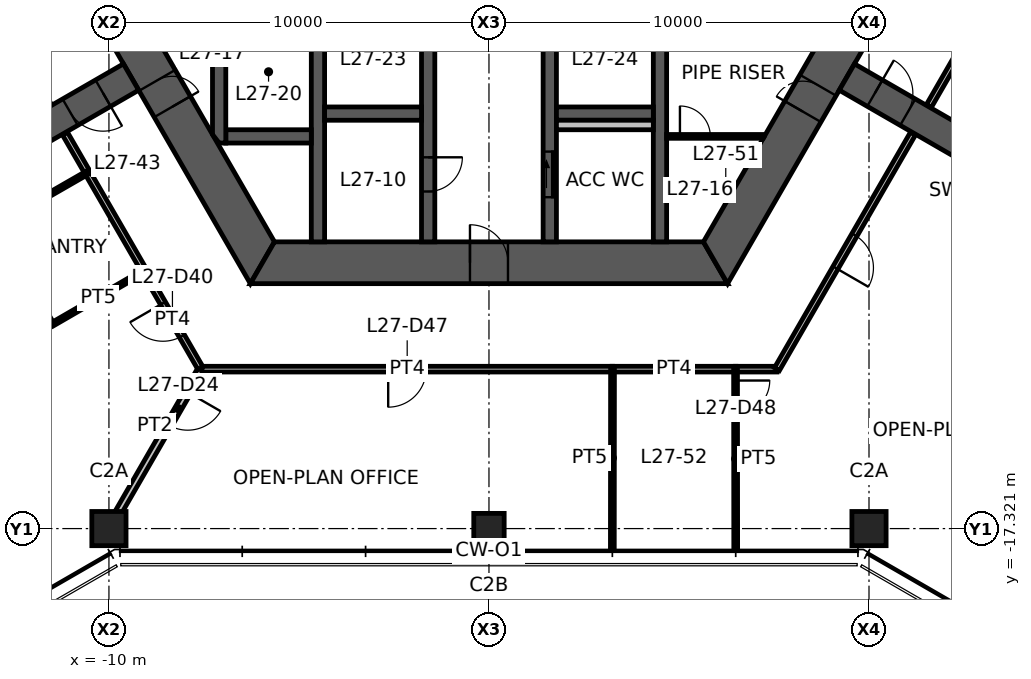
"""IFC4 building model, lengths in metres.
Left out: names, types, materials, properties, quantities, classifications, styles, units other than length and angle.
Written with IfcOpenShell. Run it as: python <this file> out.ifc"""

import sys

from ifc_helpers import new_model, si_unit, direction, frame, frame_2d, origin, origin_2d, place, context, subcontext, project, spatial, polyline, rectangle, hollow_rectangle, outline, extrude, element, fill, save


model = new_model("IFC4")
c1 = context("Model", 3, precision=1e-05, world=origin(), true_north=direction((0.0, 1.0)))
c2 = subcontext(c1, "Body", "Model", "MODEL_VIEW")
j1 = project(units=[si_unit("LENGTHUNIT", "METRE"), si_unit("PLANEANGLEUNIT", "RADIAN")], contexts=[c1])
p1 = place(None, origin())
s1 = spatial("IfcSite", under=j1, at=p1, CompositionType="ELEMENT")
p2 = place(p1, origin())
s2 = spatial("IfcBuilding", under=s1, at=p2, CompositionType="ELEMENT")
p3 = place(p2, frame((0.0, 0.0, 108.0)))
s3 = spatial("IfcBuildingStorey", under=s2, at=p3, CompositionType="ELEMENT", Elevation=108.0)
for number, where, z_axis, x_axis in (
    (1, (-10.0, -17.321, 0.0), (0.0, 0.0, 1.0), (1.0, 0.0, 0.0)),
    (2, (10.0, -17.321, 0.0), (0.0, 0.0, 1.0), (1.0, 0.0, 0.0)),
):
    element("IfcColumn", number, at=place(p3, frame(where, z_axis=z_axis, x_axis=x_axis)), inside=s3, PredefinedType="COLUMN", context=c2, shape_type="SweptSolid", body=[
        extrude(hollow_rectangle(XDim=0.9, YDim=0.9, WallThickness=0.055, at=origin_2d()), origin(), (0.0, 0.0, 1.0), 3.9),
    ])
p4 = place(p3, frame((0.0, -17.321, 0.0), z_axis=(0.0, 0.0, 1.0), x_axis=(1.0, 0.0, 0.0)))
e3 = element("IfcColumn", 3, at=p4, inside=s3, PredefinedType="COLUMN", context=c2, shape_type="SweptSolid", body=[
    extrude(hollow_rectangle(XDim=0.8, YDim=0.8, WallThickness=0.045, at=origin_2d()), origin(), (0.0, 0.0, 1.0), 3.9),
])
p5 = place(p3, frame((-11.922, 0.0, 0.0), z_axis=(0.0, 0.0, 1.0), x_axis=(0.500004296715, -0.866022923061, 0.0)))
e4 = element("IfcWall", 4, at=p5, inside=s3, PredefinedType="SHEAR", context=c2, shape_type="SweptSolid", body=[
    extrude(outline(polyline([(-0.318, -0.55), (6.381, -0.55), (7.181, -0.55), (12.24, -0.55), (11.605, 0.55), (7.181, 0.55), (6.381, 0.55), (0.318, 0.55), (-0.318, -0.55)])), origin(), (0.0, 0.0, 1.0), 3.9),
])
p6 = place(p5, frame((6.381, 0.0, 0.0)))
e5 = element("IfcOpeningElement", 5, at=p6, cuts=e4, PredefinedType="OPENING", context=c2, shape_type="SweptSolid", body=[
    extrude(rectangle(XDim=0.8, YDim=2.1, at=frame_2d((0.4, 1.05))), frame((0.0, 0.56, 0.0), z_axis=(0.0, -1.0, 0.0), x_axis=(1.0, 0.0, 0.0)), (0.0, 0.0, 1.0), 1.12),
])
p7 = place(p3, frame((-5.961, -10.325, 0.0), z_axis=(0.0, 0.0, 1.0), x_axis=(1.0, 0.0, 0.0)))
e6 = element("IfcWall", 6, at=p7, inside=s3, PredefinedType="SHEAR", context=c2, shape_type="SweptSolid", body=[
    extrude(outline(polyline([(-0.318, -0.55), (5.461, -0.55), (6.461, -0.55), (12.24, -0.55), (11.605, 0.55), (6.461, 0.55), (5.461, 0.55), (0.318, 0.55), (-0.318, -0.55)])), origin(), (0.0, 0.0, 1.0), 3.9),
])
p8 = place(p7, frame((5.461, 0.0, 0.0)))
e7 = element("IfcOpeningElement", 7, at=p8, cuts=e6, PredefinedType="OPENING", context=c2, shape_type="SweptSolid", body=[
    extrude(rectangle(XDim=1.0, YDim=2.1, at=frame_2d((0.5, 1.05))), frame((0.0, 0.56, 0.0), z_axis=(0.0, -1.0, 0.0), x_axis=(1.0, 0.0, 0.0)), (0.0, 0.0, 1.0), 1.12),
])
p9 = place(p3, frame((5.961, -10.325, 0.0), z_axis=(0.0, 0.0, 1.0), x_axis=(0.500004296715, 0.866022923061, 0.0)))
e8 = element("IfcWall", 8, at=p9, inside=s3, PredefinedType="SHEAR", context=c2, shape_type="SweptSolid", body=[
    extrude(outline(polyline([(-0.318, -0.55), (4.594, -0.55), (5.394, -0.55), (12.24, -0.55), (11.605, 0.55), (5.394, 0.55), (4.594, 0.55), (0.318, 0.55), (-0.318, -0.55)])), origin(), (0.0, 0.0, 1.0), 3.9),
])
p10 = place(p9, frame((4.594, 0.0, 0.0)))
e9 = element("IfcOpeningElement", 9, at=p10, cuts=e8, PredefinedType="OPENING", context=c2, shape_type="SweptSolid", body=[
    extrude(rectangle(XDim=0.8, YDim=2.1, at=frame_2d((0.4, 1.05))), frame((0.0, 0.56, 0.0), z_axis=(0.0, -1.0, 0.0), x_axis=(1.0, 0.0, 0.0)), (0.0, 0.0, 1.0), 1.12),
])
p11 = place(p3, frame((-9.418, -5.438, 0.0), z_axis=(0.0, 0.0, 1.0), x_axis=(-0.866029782078, -0.499992416496, 0.0)))
e10 = element("IfcWall", 10, at=p11, inside=s3, PredefinedType="SHEAR", context=c2, shape_type="SweptSolid", body=[
    extrude(rectangle(XDim=7.646, YDim=0.8, at=frame_2d((3.823, 0.0))), origin(), (0.0, 0.0, 1.0), 3.9),
])
p12 = place(p11, frame((0.85, 0.0, 0.0)))
e11 = element("IfcOpeningElement", 11, at=p12, cuts=e10, PredefinedType="OPENING", context=c2, shape_type="SweptSolid", body=[
    extrude(rectangle(XDim=1.0, YDim=2.1, at=frame_2d((0.5, 1.05))), frame((0.0, 0.41, 0.0), z_axis=(0.0, -1.0, 0.0), x_axis=(1.0, 0.0, 0.0)), (0.0, 0.0, 1.0), 0.82),
])
p13 = place(p3, frame((9.418, -5.438, 0.0), z_axis=(0.0, 0.0, 1.0), x_axis=(0.866029782078, -0.499992416496, 0.0)))
e12 = element("IfcWall", 12, at=p13, inside=s3, PredefinedType="SHEAR", context=c2, shape_type="SweptSolid", body=[
    extrude(rectangle(XDim=7.646, YDim=0.8, at=frame_2d((3.823, 0.0))), origin(), (0.0, 0.0, 1.0), 3.9),
])
p14 = place(p13, frame((0.85, 0.0, 0.0)))
e13 = element("IfcOpeningElement", 13, at=p14, cuts=e12, PredefinedType="OPENING", context=c2, shape_type="SweptSolid", body=[
    extrude(rectangle(XDim=1.0, YDim=2.1, at=frame_2d((0.5, 1.05))), frame((0.0, 0.41, 0.0), z_axis=(0.0, -1.0, 0.0), x_axis=(1.0, 0.0, 0.0)), (0.0, 0.0, 1.0), 0.82),
])
p15 = place(p3, frame((-1.6, -3.775, 0.0), z_axis=(0.0, 0.0, 1.0), x_axis=(0.0, -1.0, 0.0)))
e14 = element("IfcWall", 14, at=p15, inside=s3, PredefinedType="SHEAR", context=c2, shape_type="SweptSolid", body=[
    extrude(rectangle(XDim=6.0, YDim=0.35, at=frame_2d((3.0, 0.0))), origin(), (0.0, 0.0, 1.0), 3.9),
])
p16 = place(p15, frame((3.775, 0.0, 0.0)))
e15 = element("IfcOpeningElement", 15, at=p16, cuts=e14, PredefinedType="OPENING", context=c2, shape_type="SweptSolid", body=[
    extrude(rectangle(XDim=0.9, YDim=2.1, at=frame_2d((0.45, 1.05))), frame((0.0, 0.185, 0.0), z_axis=(0.0, -1.0, 0.0), x_axis=(1.0, 0.0, 0.0)), (0.0, 0.0, 1.0), 0.37),
])
p17 = place(p3, frame((1.6, -3.775, 0.0), z_axis=(0.0, 0.0, 1.0), x_axis=(0.0, -1.0, 0.0)))
e16 = element("IfcWall", 16, at=p17, inside=s3, PredefinedType="SHEAR", context=c2, shape_type="SweptSolid", body=[
    extrude(rectangle(XDim=6.0, YDim=0.35, at=frame_2d((3.0, 0.0))), origin(), (0.0, 0.0, 1.0), 3.9),
])
p18 = place(p17, frame((3.625, 0.0, 0.0)))
e17 = element("IfcOpeningElement", 17, at=p18, cuts=e16, PredefinedType="OPENING", context=c2, shape_type="SweptSolid", body=[
    extrude(rectangle(XDim=1.2, YDim=2.1, at=frame_2d((0.6, 1.05))), frame((0.0, 0.185, 0.0), z_axis=(0.0, -1.0, 0.0), x_axis=(1.0, 0.0, 0.0)), (0.0, 0.0, 1.0), 0.37),
])
for number, where, z_axis, x_axis in (
    (18, (-4.5, -3.775, 0.0), (0.0, 0.0, 1.0), (0.0, -1.0, 0.0)),
    (19, (4.5, -3.775, 0.0), (0.0, 0.0, 1.0), (0.0, -1.0, 0.0)),
):
    element("IfcWall", number, at=place(p3, frame(where, z_axis=z_axis, x_axis=x_axis)), inside=s3, PredefinedType="SHEAR", context=c2, shape_type="SweptSolid", body=[
        extrude(rectangle(XDim=6.0, YDim=0.35, at=frame_2d((3.0, 0.0))), origin(), (0.0, 0.0, 1.0), 3.9),
    ])
for number, where, z_axis, x_axis in (
    (20, (-4.325, -6.4, 0.0), (0.0, 0.0, 1.0), (1.0, 0.0, 0.0)),
    (21, (1.775, -6.4, 0.0), (0.0, 0.0, 1.0), (1.0, 0.0, 0.0)),
):
    element("IfcWall", number, at=place(p3, frame(where, z_axis=z_axis, x_axis=x_axis)), inside=s3, PredefinedType="SHEAR", context=c2, shape_type="SweptSolid", body=[
        extrude(rectangle(XDim=2.55, YDim=0.35, at=frame_2d((1.275, 0.0))), origin(), (0.0, 0.0, 1.0), 3.9),
    ])
p19 = place(p3, frame((-6.925, -7.0, 0.0), z_axis=(0.0, 0.0, 1.0), x_axis=(1.0, 0.0, 0.0)))
e22 = element("IfcWall", 22, at=p19, inside=s3, PredefinedType="SHEAR", context=c2, shape_type="SweptSolid", body=[
    extrude(rectangle(XDim=2.25, YDim=0.35, at=frame_2d((1.125, 0.0))), origin(), (0.0, 0.0, 1.0), 3.9),
])
p20 = place(p3, frame((-7.1, -3.775, 0.0), z_axis=(0.0, 0.0, 1.0), x_axis=(0.0, -1.0, 0.0)))
e23 = element("IfcWall", 23, at=p20, inside=s3, PredefinedType="SHEAR", context=c2, shape_type="SweptSolid", body=[
    extrude(outline(polyline([(0.0, -0.175), (3.175, -0.175), (3.4, 0.0), (3.4, 0.175), (0.0, 0.175), (0.0, -0.175)])), origin(), (0.0, 0.0, 1.0), 3.9),
])
p21 = place(p3, frame((1.775, -6.7, 0.0), z_axis=(0.0, 0.0, 1.0), x_axis=(1.0, 0.0, 0.0)))
e24 = element("IfcWall", 24, at=p21, inside=s3, PredefinedType="PLUMBINGWALL", context=c2, shape_type="SweptSolid", body=[
    extrude(rectangle(XDim=2.55, YDim=0.25, at=frame_2d((1.275, 0.0))), origin(), (0.0, 0.0, 1.0), 3.9),
])
p22 = place(p3, frame((4.675, -7.0, 0.0), z_axis=(0.0, 0.0, 1.0), x_axis=(1.0, 0.0, 0.0)))
e25 = element("IfcWall", 25, at=p22, inside=s3, PredefinedType="PARTITIONING", context=c2, shape_type="SweptSolid", body=[
    extrude(outline(polyline([(0.0, -0.05), (0.35, -0.05), (1.15, -0.05), (2.542, -0.05), (2.571, 0.0), (2.577, 0.05), (1.15, 0.05), (0.35, 0.05), (0.0, 0.05), (0.0, -0.05)])), origin(), (0.0, 0.0, 1.0), 2.95),
])
p23 = place(p22, frame((0.35, 0.0, 0.0)))
e26 = element("IfcOpeningElement", 26, at=p23, cuts=e25, PredefinedType="OPENING", context=c2, shape_type="SweptSolid", body=[
    extrude(rectangle(XDim=0.8, YDim=2.1, at=frame_2d((0.4, 1.05))), frame((0.0, 0.06, 0.0), z_axis=(0.0, -1.0, 0.0), x_axis=(1.0, 0.0, 0.0)), (0.0, 0.0, 1.0), 0.12),
])
p24 = place(p3, frame((-7.578, -13.125, 0.0), z_axis=(0.0, 0.0, 1.0), x_axis=(-0.500008905493, -0.866020262135, 0.0)))
e27 = element("IfcWall", 27, at=p24, inside=s3, PredefinedType="PARTITIONING", context=c2, shape_type="SweptSolid", body=[
    extrude(rectangle(XDim=4.845, YDim=0.175, at=frame_2d((2.422, 0.0))), origin(), (0.0, 0.0, 1.0), 3.05),
])
p25 = place(p24, frame((0.7, 0.0, 0.0)))
e28 = element("IfcOpeningElement", 28, at=p25, cuts=e27, PredefinedType="OPENING", context=c2, shape_type="SweptSolid", body=[
    extrude(rectangle(XDim=1.0, YDim=2.1, at=frame_2d((0.5, 1.05))), frame((0.0, 0.098, 0.0), z_axis=(0.0, -1.0, 0.0), x_axis=(1.0, 0.0, 0.0)), (0.0, 0.0, 1.0), 0.195),
])
p26 = place(p3, frame((-9.064, -10.551, 0.0), z_axis=(0.0, 0.0, 1.0), x_axis=(-0.499977562641, 0.866038357612, 0.0)))
e29 = element("IfcWall", 29, at=p26, inside=s3, PredefinedType="PARTITIONING", context=c2, shape_type="SweptSolid", body=[
    extrude(rectangle(XDim=3.01, YDim=0.15, at=frame_2d((1.505, 0.0))), origin(), (0.0, 0.0, 1.0), 2.95),
])
p27 = place(p3, frame((-10.564, -7.952, 0.0), z_axis=(0.0, 0.0, 1.0), x_axis=(-0.500085263423, 0.865976171327, 0.0)))
e30 = element("IfcWall", 30, at=p27, inside=s3, PredefinedType="PARTITIONING", context=c2, shape_type="SweptSolid", body=[
    extrude(rectangle(XDim=1.184, YDim=0.15, at=frame_2d((0.592, 0.0))), origin(), (0.0, 0.0, 1.0), 2.95),
])
p28 = place(p3, frame((-7.589, -13.105, 0.0), z_axis=(0.0, 0.0, 1.0), x_axis=(-0.499972416139, 0.866041328748, 0.0)))
e31 = element("IfcWall", 31, at=p28, inside=s3, PredefinedType="PARTITIONING", context=c2, shape_type="SweptSolid", body=[
    extrude(rectangle(XDim=2.959, YDim=0.15, at=frame_2d((1.479, 0.0))), origin(), (0.0, 0.0, 1.0), 2.95),
])
p29 = place(p28, frame((0.979, 0.0, 0.0)))
e32 = element("IfcOpeningElement", 32, at=p29, cuts=e31, PredefinedType="OPENING", context=c2, shape_type="SweptSolid", body=[
    extrude(rectangle(XDim=1.0, YDim=2.1, at=frame_2d((0.5, 1.05))), frame((0.0, 0.085, 0.0), z_axis=(0.0, -1.0, 0.0), x_axis=(1.0, 0.0, 0.0)), (0.0, 0.0, 1.0), 0.17),
])
p30 = place(p3, frame((-12.991, -9.348, 0.0), z_axis=(0.0, 0.0, 1.0), x_axis=(0.866817750494, 0.498625097071, 0.0)))
e33 = element("IfcWall", 33, at=p30, inside=s3, PredefinedType="PARTITIONING", context=c2, shape_type="SweptSolid", body=[
    extrude(rectangle(XDim=2.8, YDim=0.1, at=frame_2d((1.4, 0.0))), origin(), (0.0, 0.0, 1.0), 2.95),
])
p31 = place(p3, frame((-11.491, -11.946, 0.0), z_axis=(0.0, 0.0, 1.0), x_axis=(-0.499990139034, 0.866031096941, 0.0)))
e34 = element("IfcWall", 34, at=p31, inside=s3, PredefinedType="PARTITIONING", context=c2, shape_type="SweptSolid", body=[
    extrude(rectangle(XDim=3.0, YDim=0.1, at=frame_2d((1.5, 0.0))), origin(), (0.0, 0.0, 1.0), 2.95),
])
p32 = place(p31, frame((1.8, 0.0, 0.0)))
e35 = element("IfcOpeningElement", 35, at=p32, cuts=e34, PredefinedType="OPENING", context=c2, shape_type="SweptSolid", body=[
    extrude(rectangle(XDim=0.9, YDim=2.1, at=frame_2d((0.45, 1.05))), frame((0.0, 0.06, 0.0), z_axis=(0.0, -1.0, 0.0), x_axis=(1.0, 0.0, 0.0)), (0.0, 0.0, 1.0), 0.12),
])
p33 = place(p3, frame((-9.069, -10.542, 0.0), z_axis=(0.0, 0.0, 1.0), x_axis=(-0.865195372903, -0.501434907746, 0.0)))
e36 = element("IfcWall", 36, at=p33, inside=s3, PredefinedType="PARTITIONING", context=c2, shape_type="SweptSolid", body=[
    extrude(rectangle(XDim=2.8, YDim=0.1, at=frame_2d((1.4, 0.0))), origin(), (0.0, 0.0, 1.0), 2.95),
])
p34 = place(p3, frame((15.144, -0.02, 0.0), z_axis=(0.0, 0.0, 1.0), x_axis=(-0.499985098601, -0.86603400694, 0.0)))
e37 = element("IfcWall", 37, at=p34, inside=s3, PredefinedType="PARTITIONING", context=c2, shape_type="SweptSolid", body=[
    extrude(rectangle(XDim=7.135, YDim=0.15, at=frame_2d((3.567, 0.0))), origin(), (0.0, 0.0, 1.0), 2.95),
])
p35 = place(p34, frame((3.067, 0.0, 0.0)))
e38 = element("IfcOpeningElement", 38, at=p35, cuts=e37, PredefinedType="OPENING", context=c2, shape_type="SweptSolid", body=[
    extrude(rectangle(XDim=1.0, YDim=2.1, at=frame_2d((0.5, 1.05))), frame((0.0, 0.085, 0.0), z_axis=(0.0, -1.0, 0.0), x_axis=(1.0, 0.0, 0.0)), (0.0, 0.0, 1.0), 0.17),
])
p36 = place(p3, frame((6.498, -13.125, 0.0), z_axis=(0.0, 0.0, 1.0), x_axis=(-1.0, 0.0, 0.0)))
e39 = element("IfcWall", 39, at=p36, inside=s3, PredefinedType="PARTITIONING", context=c2, shape_type="SweptSolid", body=[
    extrude(rectangle(XDim=3.256, YDim=0.15, at=frame_2d((1.628, 0.0))), origin(), (0.0, 0.0, 1.0), 2.95),
])
p37 = place(p3, frame((7.578, -13.125, 0.0), z_axis=(0.0, 0.0, 1.0), x_axis=(-1.0, 0.0, 0.0)))
e40 = element("IfcWall", 40, at=p37, inside=s3, PredefinedType="PARTITIONING", context=c2, shape_type="SweptSolid", body=[
    extrude(rectangle(XDim=1.089, YDim=0.15, at=frame_2d((0.545, 0.0))), origin(), (0.0, 0.0, 1.0), 2.95),
])
p38 = place(p3, frame((11.156, -6.926, 0.0), z_axis=(0.0, 0.0, 1.0), x_axis=(-0.500001961223, -0.866024271469, 0.0)))
e41 = element("IfcWall", 41, at=p38, inside=s3, PredefinedType="PARTITIONING", context=c2, shape_type="SweptSolid", body=[
    extrude(rectangle(XDim=7.158, YDim=0.15, at=frame_2d((3.579, 0.0))), origin(), (0.0, 0.0, 1.0), 2.95),
])
p39 = place(p38, frame((3.079, 0.0, 0.0)))
e42 = element("IfcOpeningElement", 42, at=p39, cuts=e41, PredefinedType="OPENING", context=c2, shape_type="SweptSolid", body=[
    extrude(rectangle(XDim=1.0, YDim=2.1, at=frame_2d((0.5, 1.05))), frame((0.0, 0.085, 0.0), z_axis=(0.0, -1.0, 0.0), x_axis=(1.0, 0.0, 0.0)), (0.0, 0.0, 1.0), 0.17),
])
p40 = place(p3, frame((3.251, -13.125, 0.0), z_axis=(0.0, 0.0, 1.0), x_axis=(-1.0, 0.0, 0.0)))
e43 = element("IfcWall", 43, at=p40, inside=s3, PredefinedType="PARTITIONING", context=c2, shape_type="SweptSolid", body=[
    extrude(rectangle(XDim=10.806, YDim=0.15, at=frame_2d((5.403, 0.0))), origin(), (0.0, 0.0, 1.0), 2.95),
])
p41 = place(p40, frame((4.903, 0.0, 0.0)))
e44 = element("IfcOpeningElement", 44, at=p41, cuts=e43, PredefinedType="OPENING", context=c2, shape_type="SweptSolid", body=[
    extrude(rectangle(XDim=1.0, YDim=2.1, at=frame_2d((0.5, 1.05))), frame((0.0, 0.085, 0.0), z_axis=(0.0, -1.0, 0.0), x_axis=(1.0, 0.0, 0.0)), (0.0, 0.0, 1.0), 0.17),
])
p42 = place(p3, frame((6.488, -13.125, 0.0), z_axis=(0.0, 0.0, 1.0), x_axis=(0.000982673433, -0.999999517176, 0.0)))
e45 = element("IfcWall", 45, at=p42, inside=s3, PredefinedType="PARTITIONING", context=c2, shape_type="SweptSolid", body=[
    extrude(rectangle(XDim=4.72, YDim=0.1, at=frame_2d((2.36, 0.0))), origin(), (0.0, 0.0, 1.0), 2.95),
])
p43 = place(p42, frame((0.3, 0.0, 0.0)))
e46 = element("IfcOpeningElement", 46, at=p43, cuts=e45, PredefinedType="OPENING", context=c2, shape_type="SweptSolid", body=[
    extrude(rectangle(XDim=0.9, YDim=2.1, at=frame_2d((0.45, 1.05))), frame((0.0, 0.06, 0.0), z_axis=(0.0, -1.0, 0.0), x_axis=(1.0, 0.0, 0.0)), (0.0, 0.0, 1.0), 0.12),
])
p44 = place(p3, frame((3.246, -17.801, 0.0), z_axis=(0.0, 0.0, 1.0), x_axis=(0.000992114806, 0.999999507854, 0.0)))
e47 = element("IfcWall", 47, at=p44, inside=s3, PredefinedType="PARTITIONING", context=c2, shape_type="SweptSolid", body=[
    extrude(rectangle(XDim=4.676, YDim=0.1, at=frame_2d((2.338, 0.0))), origin(), (0.0, 0.0, 1.0), 2.95),
])
p45 = place(p8, origin())
e48 = element("IfcDoor", 48, at=p45, inside=s3, OperationType="SINGLE_SWING_LEFT", PredefinedType="DOOR", context=c2, shape_type="SweptSolid", body=[
    extrude(rectangle(XDim=1.0, YDim=2.1, at=frame_2d((0.5, 1.05))), frame((0.0, 0.025, 0.0), z_axis=(0.0, -1.0, 0.0), x_axis=(1.0, 0.0, 0.0)), (0.0, 0.0, 1.0), 0.05),
])
fill(e7, e48)
p46 = place(p10, origin())
e49 = element("IfcDoor", 49, at=p46, inside=s3, OperationType="SINGLE_SWING_LEFT", PredefinedType="DOOR", context=c2, shape_type="SweptSolid", body=[
    extrude(rectangle(XDim=0.8, YDim=2.1, at=frame_2d((0.4, 1.05))), frame((0.0, 0.025, 0.0), z_axis=(0.0, -1.0, 0.0), x_axis=(1.0, 0.0, 0.0)), (0.0, 0.0, 1.0), 0.05),
])
fill(e9, e49)
p47 = place(p6, origin())
e50 = element("IfcDoor", 50, at=p47, inside=s3, OperationType="SINGLE_SWING_RIGHT", PredefinedType="DOOR", context=c2, shape_type="SweptSolid", body=[
    extrude(rectangle(XDim=0.8, YDim=2.1, at=frame_2d((0.4, 1.05))), frame((0.0, 0.025, 0.0), z_axis=(0.0, -1.0, 0.0), x_axis=(1.0, 0.0, 0.0)), (0.0, 0.0, 1.0), 0.05),
])
fill(e5, e50)
p48 = place(p18, origin())
e51 = element("IfcDoor", 51, at=p48, inside=s3, OperationType="SLIDING_TO_LEFT", PredefinedType="DOOR", context=c2, shape_type="SweptSolid", body=[
    extrude(rectangle(XDim=1.2, YDim=2.1, at=frame_2d((0.6, 1.05))), frame((0.0, 0.025, 0.0), z_axis=(0.0, -1.0, 0.0), x_axis=(1.0, 0.0, 0.0)), (0.0, 0.0, 1.0), 0.05),
])
fill(e17, e51)
p49 = place(p16, origin())
e52 = element("IfcDoor", 52, at=p49, inside=s3, OperationType="SINGLE_SWING_LEFT", PredefinedType="DOOR", context=c2, shape_type="SweptSolid", body=[
    extrude(rectangle(XDim=0.9, YDim=2.1, at=frame_2d((0.45, 1.05))), frame((0.0, 0.025, 0.0), z_axis=(0.0, -1.0, 0.0), x_axis=(1.0, 0.0, 0.0)), (0.0, 0.0, 1.0), 0.05),
])
fill(e15, e52)
p50 = place(p12, origin())
e53 = element("IfcDoor", 53, at=p50, inside=s3, OperationType="SINGLE_SWING_LEFT", PredefinedType="DOOR", context=c2, shape_type="SweptSolid", body=[
    extrude(rectangle(XDim=1.0, YDim=2.1, at=frame_2d((0.5, 1.05))), frame((0.0, 0.025, 0.0), z_axis=(0.0, -1.0, 0.0), x_axis=(1.0, 0.0, 0.0)), (0.0, 0.0, 1.0), 0.05),
])
fill(e11, e53)
p51 = place(p14, origin())
e54 = element("IfcDoor", 54, at=p51, inside=s3, OperationType="SINGLE_SWING_LEFT", PredefinedType="DOOR", context=c2, shape_type="SweptSolid", body=[
    extrude(rectangle(XDim=1.0, YDim=2.1, at=frame_2d((0.5, 1.05))), frame((0.0, 0.025, 0.0), z_axis=(0.0, -1.0, 0.0), x_axis=(1.0, 0.0, 0.0)), (0.0, 0.0, 1.0), 0.05),
])
fill(e13, e54)
p52 = place(p23, origin())
e55 = element("IfcDoor", 55, at=p52, inside=s3, OperationType="SINGLE_SWING_LEFT", PredefinedType="DOOR", context=c2, shape_type="SweptSolid", body=[
    extrude(rectangle(XDim=0.8, YDim=2.1, at=frame_2d((0.4, 1.05))), frame((0.0, 0.025, 0.0), z_axis=(0.0, -1.0, 0.0), x_axis=(1.0, 0.0, 0.0)), (0.0, 0.0, 1.0), 0.05),
])
fill(e26, e55)
p53 = place(p25, origin())
e56 = element("IfcDoor", 56, at=p53, inside=s3, OperationType="SINGLE_SWING_LEFT", PredefinedType="DOOR", context=c2, shape_type="SweptSolid", body=[
    extrude(rectangle(XDim=1.0, YDim=2.1, at=frame_2d((0.5, 1.05))), frame((0.0, 0.025, 0.0), z_axis=(0.0, -1.0, 0.0), x_axis=(1.0, 0.0, 0.0)), (0.0, 0.0, 1.0), 0.05),
])
fill(e28, e56)
p54 = place(p29, origin())
e57 = element("IfcDoor", 57, at=p54, inside=s3, OperationType="SINGLE_SWING_RIGHT", PredefinedType="DOOR", context=c2, shape_type="SweptSolid", body=[
    extrude(rectangle(XDim=1.0, YDim=2.1, at=frame_2d((0.5, 1.05))), frame((0.0, 0.025, 0.0), z_axis=(0.0, -1.0, 0.0), x_axis=(1.0, 0.0, 0.0)), (0.0, 0.0, 1.0), 0.05),
])
fill(e32, e57)
p55 = place(p39, origin())
e58 = element("IfcDoor", 58, at=p55, inside=s3, OperationType="SINGLE_SWING_RIGHT", PredefinedType="DOOR", context=c2, shape_type="SweptSolid", body=[
    extrude(rectangle(XDim=1.0, YDim=2.1, at=frame_2d((0.5, 1.05))), frame((0.0, 0.025, 0.0), z_axis=(0.0, -1.0, 0.0), x_axis=(1.0, 0.0, 0.0)), (0.0, 0.0, 1.0), 0.05),
])
fill(e42, e58)
p56 = place(p41, origin())
e59 = element("IfcDoor", 59, at=p56, inside=s3, OperationType="SINGLE_SWING_RIGHT", PredefinedType="DOOR", context=c2, shape_type="SweptSolid", body=[
    extrude(rectangle(XDim=1.0, YDim=2.1, at=frame_2d((0.5, 1.05))), frame((0.0, 0.025, 0.0), z_axis=(0.0, -1.0, 0.0), x_axis=(1.0, 0.0, 0.0)), (0.0, 0.0, 1.0), 0.05),
])
fill(e44, e59)
p57 = place(p43, origin())
e60 = element("IfcDoor", 60, at=p57, inside=s3, OperationType="SINGLE_SWING_LEFT", PredefinedType="DOOR", context=c2, shape_type="SweptSolid", body=[
    extrude(rectangle(XDim=0.9, YDim=2.1, at=frame_2d((0.45, 1.05))), frame((0.0, 0.025, 0.0), z_axis=(0.0, -1.0, 0.0), x_axis=(1.0, 0.0, 0.0)), (0.0, 0.0, 1.0), 0.05),
])
fill(e46, e60)
save(model, sys.argv[1])
